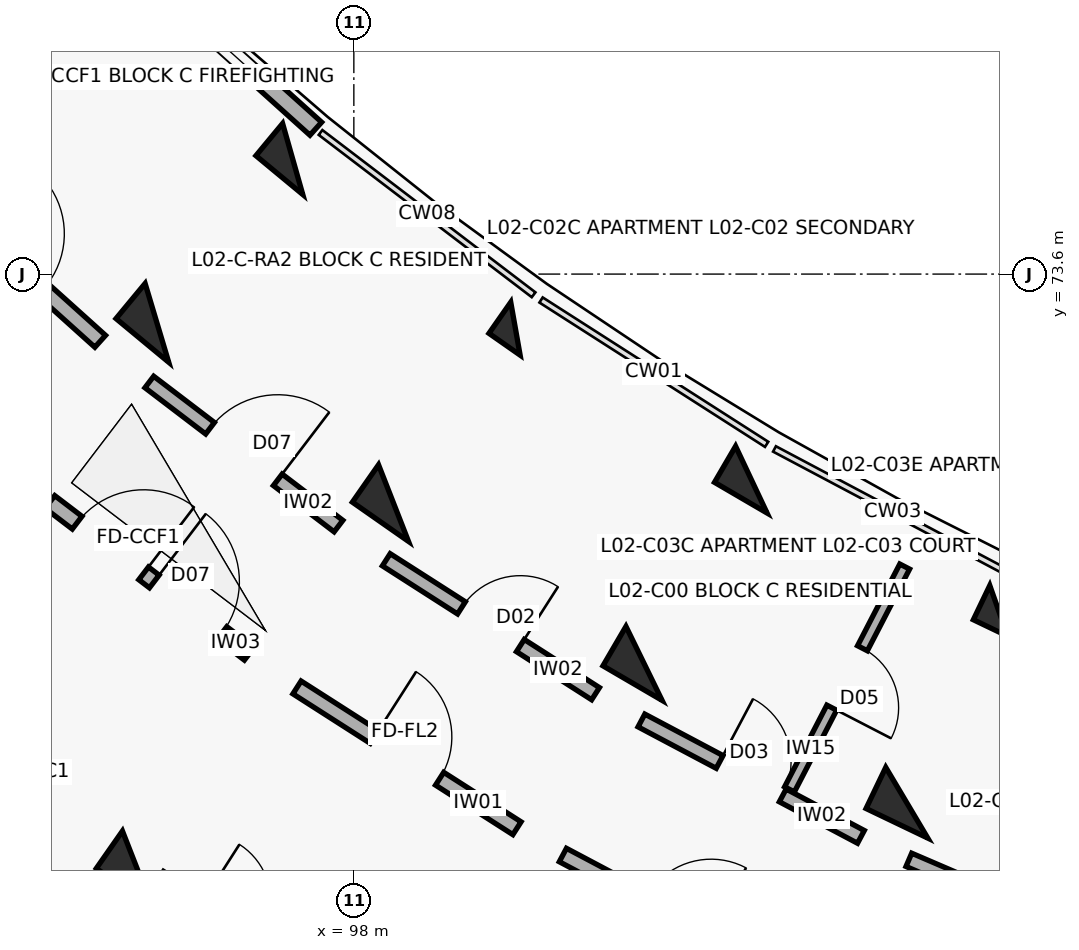
"""IFC4 building model, lengths in metres.
Left out: names, types, materials, properties, quantities, classifications, styles, units other than length and angle.
Written with IfcOpenShell. Run it as: python <this file> out.ifc"""

import sys

from ifc_helpers import new_model, si_unit, direction, frame, frame_2d, origin, origin_2d, place, context, subcontext, project, spatial, rectangle, extrude, element, fill, save


model = new_model("IFC4")
c1 = context("Model", 3, precision=1e-05, world=origin(), true_north=direction((0.0, 1.0)))
c2 = subcontext(c1, "Body", "Model", "MODEL_VIEW")
j1 = project(units=[si_unit("LENGTHUNIT", "METRE"), si_unit("PLANEANGLEUNIT", "RADIAN")], contexts=[c1])
p1 = place(None, origin())
s1 = spatial("IfcSite", under=j1, at=p1, CompositionType="ELEMENT")
p2 = place(p1, origin())
s2 = spatial("IfcBuilding", under=s1, at=p2, CompositionType="ELEMENT")
p3 = place(p2, frame((0.0, 0.0, 8.1)))
s3 = spatial("IfcBuildingStorey", under=s2, at=p3, CompositionType="ELEMENT", Elevation=8.1)
p4 = place(p3, frame((97.195, 75.115, 0.0), z_axis=(0.0, 0.0, 1.0), x_axis=(-0.637961754089, -0.770068049148, 0.0)))
e1 = element("IfcColumn", 1, at=p4, inside=s3, PredefinedType="COLUMN", context=c2, shape_type="SweptSolid", body=[
    extrude(rectangle(XDim=0.55, YDim=0.8, at=origin_2d()), origin(), (0.0, 0.0, 1.0), 3.1),
])
p5 = place(p3, frame((95.409, 72.958, 0.0), z_axis=(0.0, 0.0, 1.0), x_axis=(-0.637961754089, -0.770068049148, 0.0)))
e2 = element("IfcColumn", 2, at=p5, inside=s3, PredefinedType="COLUMN", context=c2, shape_type="SweptSolid", body=[
    extrude(rectangle(XDim=0.6, YDim=0.9, at=origin_2d()), origin(), (0.0, 0.0, 1.0), 3.1),
])
p6 = place(p3, frame((100.126, 72.882, 0.0), z_axis=(0.0, 0.0, 1.0), x_axis=(-0.573004420611, -0.819552276527, 0.0)))
e3 = element("IfcColumn", 3, at=p6, inside=s3, PredefinedType="COLUMN", context=c2, shape_type="SweptSolid", body=[
    extrude(rectangle(XDim=0.5, YDim=0.5, at=origin_2d()), origin(), (0.0, 0.0, 1.0), 3.1),
])
for number, where, z_axis, x_axis in (
    (4, (98.522, 70.587, 0.0), (0.0, 0.0, 1.0), (-0.573, -0.82, 0.0)),
    (5, (95.152, 65.768, 0.0), (0.0, 0.0, 1.0), (-0.573, -0.82, 0.0)),
):
    element("IfcColumn", number, at=place(p3, frame(where, z_axis=z_axis, x_axis=x_axis)), inside=s3, PredefinedType="COLUMN", context=c2, shape_type="SweptSolid", body=[
        extrude(rectangle(XDim=0.6, YDim=0.9, at=origin_2d()), origin(), (0.0, 0.0, 1.0), 3.1),
    ])
p7 = place(p3, frame((103.229, 70.896, 0.0), z_axis=(0.0, 0.0, 1.0), x_axis=(-0.504226211181, -0.863571611366, 0.0)))
e6 = element("IfcColumn", 6, at=p7, inside=s3, PredefinedType="COLUMN", context=c2, shape_type="SweptSolid", body=[
    extrude(rectangle(XDim=0.55, YDim=0.8, at=origin_2d()), origin(), (0.0, 0.0, 1.0), 3.1),
])
p8 = place(p3, frame((101.817, 68.478, 0.0), z_axis=(0.0, 0.0, 1.0), x_axis=(-0.504226211181, -0.863571611366, 0.0)))
e7 = element("IfcColumn", 7, at=p8, inside=s3, PredefinedType="COLUMN", context=c2, shape_type="SweptSolid", body=[
    extrude(rectangle(XDim=0.6, YDim=0.9, at=origin_2d()), origin(), (0.0, 0.0, 1.0), 3.1),
])
p9 = place(p3, frame((106.484, 69.169, 0.0), z_axis=(0.0, 0.0, 1.0), x_axis=(-0.432085748802, -0.901832526405, 0.0)))
e8 = element("IfcColumn", 8, at=p9, inside=s3, PredefinedType="COLUMN", context=c2, shape_type="SweptSolid", body=[
    extrude(rectangle(XDim=0.5, YDim=0.5, at=origin_2d()), origin(), (0.0, 0.0, 1.0), 3.1),
])
p10 = place(p3, frame((105.274, 66.644, 0.0), z_axis=(0.0, 0.0, 1.0), x_axis=(-0.432085748802, -0.901832526405, 0.0)))
e9 = element("IfcColumn", 9, at=p10, inside=s3, PredefinedType="COLUMN", context=c2, shape_type="SweptSolid", body=[
    extrude(rectangle(XDim=0.6, YDim=0.9, at=origin_2d()), origin(), (0.0, 0.0, 1.0), 3.1),
])
p11 = place(p3, frame((94.82, 77.923, 0.0), z_axis=(0.0, 0.0, 1.0), x_axis=(0.743385092197, -0.668863666751, 0.0)))
e10 = element("IfcWall", 10, at=p11, inside=s3, PredefinedType="SOLIDWALL", context=c2, shape_type="SweptSolid", body=[
    extrude(rectangle(XDim=3.604, YDim=0.23, at=frame_2d((1.802, 0.0))), origin(), (0.0, 0.0, 1.0), 2.25),
])
p12 = place(p11, frame((1.002, 0.0, 0.32)))
e11 = element("IfcOpeningElement", 11, at=p12, cuts=e10, PredefinedType="OPENING", context=c2, shape_type="SweptSolid", body=[
    extrude(rectangle(XDim=1.6, YDim=1.5, at=frame_2d((0.8, 0.75))), frame((0.0, 0.125, 0.0), z_axis=(0.0, -1.0, 0.0), x_axis=(1.0, 0.0, 0.0)), (0.0, 0.0, 1.0), 0.25),
])
p13 = place(p3, frame((92.337, 74.808, 0.0), z_axis=(0.0, 0.0, 1.0), x_axis=(0.743348465558, -0.668904371904, 0.0)))
e12 = element("IfcWall", 12, at=p13, inside=s3, PredefinedType="SOLIDWALL", context=c2, shape_type="SweptSolid", body=[
    extrude(rectangle(XDim=3.129, YDim=0.21, at=frame_2d((1.564, 0.0))), origin(), (0.0, 0.0, 1.0), 2.08),
])
p14 = place(p13, frame((1.014, 0.0, 0.0)))
e13 = element("IfcOpeningElement", 13, at=p14, cuts=e12, PredefinedType="OPENING", context=c2, shape_type="SweptSolid", body=[
    extrude(rectangle(XDim=1.1, YDim=2.15, at=frame_2d((0.55, 1.075))), frame((0.0, 0.115, 0.0), z_axis=(0.0, -1.0, 0.0), x_axis=(1.0, 0.0, 0.0)), (0.0, 0.0, 1.0), 0.23),
])
p15 = place(p3, frame((94.001, 70.602, 0.0), z_axis=(0.0, 0.0, 1.0), x_axis=(0.795498026433, -0.605956178235, 0.0)))
e14 = element("IfcWall", 14, at=p15, inside=s3, PredefinedType="SOLIDWALL", context=c2, shape_type="SweptSolid", body=[
    extrude(rectangle(XDim=3.296, YDim=0.21, at=frame_2d((1.648, 0.0))), origin(), (0.0, 0.0, 1.0), 2.08),
])
p16 = place(p15, frame((0.45, 0.0, 0.0)))
e15 = element("IfcOpeningElement", 15, at=p16, cuts=e14, PredefinedType="OPENING", context=c2, shape_type="SweptSolid", body=[
    extrude(rectangle(XDim=1.1, YDim=2.15, at=frame_2d((0.55, 1.075))), frame((0.0, 0.115, 0.0), z_axis=(0.0, -1.0, 0.0), x_axis=(1.0, 0.0, 0.0)), (0.0, 0.0, 1.0), 0.23),
])
p17 = place(p15, frame((1.726, 0.0, 0.0)))
e16 = element("IfcOpeningElement", 16, at=p17, cuts=e14, PredefinedType="OPENING", context=c2, shape_type="SweptSolid", body=[
    extrude(rectangle(XDim=1.12, YDim=2.15, at=frame_2d((0.56, 1.075))), frame((0.0, 0.115, 0.0), z_axis=(0.0, -1.0, 0.0), x_axis=(1.0, 0.0, 0.0)), (0.0, 0.0, 1.0), 0.23),
])
p18 = place(p3, frame((95.309, 72.18, 0.0), z_axis=(0.0, 0.0, 1.0), x_axis=(0.795463961918, -0.606000895453, 0.0)))
e17 = element("IfcWall", 17, at=p18, inside=s3, PredefinedType="SOLIDWALL", context=c2, shape_type="SweptSolid", body=[
    extrude(rectangle(XDim=3.129, YDim=0.19, at=frame_2d((1.564, 0.0))), origin(), (0.0, 0.0, 1.0), 2.08),
])
p19 = place(p18, frame((1.004, 0.0, 0.0)))
e18 = element("IfcOpeningElement", 18, at=p19, cuts=e17, PredefinedType="OPENING", context=c2, shape_type="SweptSolid", body=[
    extrude(rectangle(XDim=1.12, YDim=2.15, at=frame_2d((0.56, 1.075))), frame((0.0, 0.105, 0.0), z_axis=(0.0, -1.0, 0.0), x_axis=(1.0, 0.0, 0.0)), (0.0, 0.0, 1.0), 0.21),
])
p20 = place(p3, frame((97.252, 68.161, 0.0), z_axis=(0.0, 0.0, 1.0), x_axis=(0.842289466461, -0.53902546757, 0.0)))
e19 = element("IfcWall", 19, at=p20, inside=s3, PredefinedType="SOLIDWALL", context=c2, shape_type="SweptSolid", body=[
    extrude(rectangle(XDim=3.436, YDim=0.2, at=frame_2d((1.718, 0.0))), origin(), (0.0, 0.0, 1.0), 2.08),
])
p21 = place(p20, frame((1.208, 0.0, 0.0)))
e20 = element("IfcOpeningElement", 20, at=p21, cuts=e19, PredefinedType="OPENING", context=c2, shape_type="SweptSolid", body=[
    extrude(rectangle(XDim=1.02, YDim=2.15, at=frame_2d((0.51, 1.075))), frame((0.0, 0.11, 0.0), z_axis=(0.0, -1.0, 0.0), x_axis=(1.0, 0.0, 0.0)), (0.0, 0.0, 1.0), 0.22),
])
p22 = place(p3, frame((98.427, 69.841, 0.0), z_axis=(0.0, 0.0, 1.0), x_axis=(0.842280895761, -0.539038860043, 0.0)))
e21 = element("IfcWall", 21, at=p22, inside=s3, PredefinedType="SOLIDWALL", context=c2, shape_type="SweptSolid", body=[
    extrude(rectangle(XDim=3.269, YDim=0.19, at=frame_2d((1.634, 0.0))), origin(), (0.0, 0.0, 1.0), 2.08),
])
p23 = place(p22, frame((1.174, 0.0, 0.0)))
e22 = element("IfcOpeningElement", 22, at=p23, cuts=e21, PredefinedType="OPENING", context=c2, shape_type="SweptSolid", body=[
    extrude(rectangle(XDim=0.92, YDim=2.1, at=frame_2d((0.46, 1.05))), frame((0.0, 0.105, 0.0), z_axis=(0.0, -1.0, 0.0), x_axis=(1.0, 0.0, 0.0)), (0.0, 0.0, 1.0), 0.21),
])
p24 = place(p3, frame((100.75, 65.956, 0.0), z_axis=(0.0, 0.0, 1.0), x_axis=(0.883440266101, -0.468543803963, 0.0)))
e23 = element("IfcWall", 23, at=p24, inside=s3, PredefinedType="SOLIDWALL", context=c2, shape_type="SweptSolid", body=[
    extrude(rectangle(XDim=3.436, YDim=0.2, at=frame_2d((1.718, 0.0))), origin(), (0.0, 0.0, 1.0), 2.08),
])
p25 = place(p24, frame((1.228, 0.0, 0.0)))
e24 = element("IfcOpeningElement", 24, at=p25, cuts=e23, PredefinedType="OPENING", context=c2, shape_type="SweptSolid", body=[
    extrude(rectangle(XDim=0.98, YDim=2.15, at=frame_2d((0.49, 1.075))), frame((0.0, 0.11, 0.0), z_axis=(0.0, -1.0, 0.0), x_axis=(1.0, 0.0, 0.0)), (0.0, 0.0, 1.0), 0.22),
])
p26 = place(p3, frame((101.784, 67.726, 0.0), z_axis=(0.0, 0.0, 1.0), x_axis=(0.883444301944, -0.468536194293, 0.0)))
e25 = element("IfcWall", 25, at=p26, inside=s3, PredefinedType="SOLIDWALL", context=c2, shape_type="SweptSolid", body=[
    extrude(rectangle(XDim=3.269, YDim=0.19, at=frame_2d((1.634, 0.0))), origin(), (0.0, 0.0, 1.0), 2.08),
])
p27 = place(p26, frame((1.164, 0.0, 0.0)))
e26 = element("IfcOpeningElement", 26, at=p27, cuts=e25, PredefinedType="OPENING", context=c2, shape_type="SweptSolid", body=[
    extrude(rectangle(XDim=0.94, YDim=2.1, at=frame_2d((0.47, 1.05))), frame((0.0, 0.105, 0.0), z_axis=(0.0, -1.0, 0.0), x_axis=(1.0, 0.0, 0.0)), (0.0, 0.0, 1.0), 0.21),
])
p28 = place(p3, frame((105.247, 69.752, 0.0), z_axis=(0.0, 0.0, 1.0), x_axis=(-0.459187433099, -0.888339406581, 0.0)))
e27 = element("IfcWall", 27, at=p28, inside=s3, PredefinedType="PARTITIONING", context=c2, shape_type="SweptSolid", body=[
    extrude(rectangle(XDim=3.3, YDim=0.145, at=frame_2d((1.65, 0.0))), origin(), (0.0, 0.0, 1.0), 2.08),
])
p29 = place(p28, frame((1.21, 0.0, 0.0)))
e28 = element("IfcOpeningElement", 28, at=p29, cuts=e27, PredefinedType="OPENING", context=c2, shape_type="SweptSolid", body=[
    extrude(rectangle(XDim=0.88, YDim=2.1, at=frame_2d((0.44, 1.05))), frame((0.0, 0.083, 0.0), z_axis=(0.0, -1.0, 0.0), x_axis=(1.0, 0.0, 0.0)), (0.0, 0.0, 1.0), 0.165),
])
p30 = place(p3, frame((105.302, 65.893, 0.0), z_axis=(0.0, 0.0, 1.0), x_axis=(0.918723391052, -0.394901672235, 0.0)))
e29 = element("IfcWall", 29, at=p30, inside=s3, PredefinedType="SOLIDWALL", context=c2, shape_type="SweptSolid", body=[
    extrude(rectangle(XDim=3.269, YDim=0.19, at=frame_2d((1.634, 0.0))), origin(), (0.0, 0.0, 1.0), 2.08),
])
p31 = place(p30, frame((1.154, 0.0, 0.0)))
e30 = element("IfcOpeningElement", 30, at=p31, cuts=e29, PredefinedType="OPENING", context=c2, shape_type="SweptSolid", body=[
    extrude(rectangle(XDim=0.96, YDim=2.1, at=frame_2d((0.48, 1.05))), frame((0.0, 0.105, 0.0), z_axis=(0.0, -1.0, 0.0), x_axis=(1.0, 0.0, 0.0)), (0.0, 0.0, 1.0), 0.21),
])
p32 = place(p12, origin())
e31 = element("IfcWindow", 31, at=p32, inside=s3, PartitioningType="DOUBLE_PANEL_VERTICAL", PredefinedType="WINDOW", context=c2, shape_type="SweptSolid", body=[
    extrude(rectangle(XDim=1.6, YDim=1.5, at=frame_2d((0.8, 0.75))), frame((0.0, 0.03, 0.0), z_axis=(0.0, -1.0, 0.0), x_axis=(1.0, 0.0, 0.0)), (0.0, 0.0, 1.0), 0.06),
])
fill(e11, e31)
p33 = place(p16, origin())
e32 = element("IfcDoor", 32, at=p33, inside=s3, OperationType="SINGLE_SWING_RIGHT", PredefinedType="DOOR", context=c2, shape_type="SweptSolid", body=[
    extrude(rectangle(XDim=1.1, YDim=2.15, at=frame_2d((0.55, 1.075))), frame((0.0, 0.025, 0.0), z_axis=(0.0, -1.0, 0.0), x_axis=(1.0, 0.0, 0.0)), (0.0, 0.0, 1.0), 0.05),
])
fill(e15, e32)
p34 = place(p17, origin())
e33 = element("IfcDoor", 33, at=p34, inside=s3, OperationType="SINGLE_SWING_LEFT", PredefinedType="DOOR", context=c2, shape_type="SweptSolid", body=[
    extrude(rectangle(XDim=1.12, YDim=2.15, at=frame_2d((0.56, 1.075))), frame((0.0, 0.025, 0.0), z_axis=(0.0, -1.0, 0.0), x_axis=(1.0, 0.0, 0.0)), (0.0, 0.0, 1.0), 0.05),
])
fill(e16, e33)
p35 = place(p19, origin())
e34 = element("IfcDoor", 34, at=p35, inside=s3, OperationType="SINGLE_SWING_RIGHT", PredefinedType="DOOR", context=c2, shape_type="SweptSolid", body=[
    extrude(rectangle(XDim=1.12, YDim=2.15, at=frame_2d((0.56, 1.075))), frame((0.0, 0.025, 0.0), z_axis=(0.0, -1.0, 0.0), x_axis=(1.0, 0.0, 0.0)), (0.0, 0.0, 1.0), 0.05),
])
fill(e18, e34)
p36 = place(p21, origin())
e35 = element("IfcDoor", 35, at=p36, inside=s3, OperationType="SINGLE_SWING_LEFT", PredefinedType="DOOR", context=c2, shape_type="SweptSolid", body=[
    extrude(rectangle(XDim=1.02, YDim=2.15, at=frame_2d((0.51, 1.075))), frame((0.0, 0.025, 0.0), z_axis=(0.0, -1.0, 0.0), x_axis=(1.0, 0.0, 0.0)), (0.0, 0.0, 1.0), 0.05),
])
fill(e20, e35)
p37 = place(p23, origin())
e36 = element("IfcDoor", 36, at=p37, inside=s3, OperationType="SINGLE_SWING_RIGHT", PredefinedType="DOOR", context=c2, shape_type="SweptSolid", body=[
    extrude(rectangle(XDim=0.92, YDim=2.1, at=frame_2d((0.46, 1.05))), frame((0.0, 0.025, 0.0), z_axis=(0.0, -1.0, 0.0), x_axis=(1.0, 0.0, 0.0)), (0.0, 0.0, 1.0), 0.05),
])
fill(e22, e36)
p38 = place(p27, origin())
e37 = element("IfcDoor", 37, at=p38, inside=s3, OperationType="SINGLE_SWING_LEFT", PredefinedType="DOOR", context=c2, shape_type="SweptSolid", body=[
    extrude(rectangle(XDim=0.94, YDim=2.1, at=frame_2d((0.47, 1.05))), frame((0.0, 0.025, 0.0), z_axis=(0.0, -1.0, 0.0), x_axis=(1.0, 0.0, 0.0)), (0.0, 0.0, 1.0), 0.05),
])
fill(e26, e37)
p39 = place(p29, origin())
e38 = element("IfcDoor", 38, at=p39, inside=s3, OperationType="SINGLE_SWING_RIGHT", PredefinedType="DOOR", context=c2, shape_type="SweptSolid", body=[
    extrude(rectangle(XDim=0.88, YDim=2.1, at=frame_2d((0.44, 1.05))), frame((0.0, 0.025, 0.0), z_axis=(0.0, -1.0, 0.0), x_axis=(1.0, 0.0, 0.0)), (0.0, 0.0, 1.0), 0.05),
])
fill(e28, e38)
save(model, sys.argv[1])
